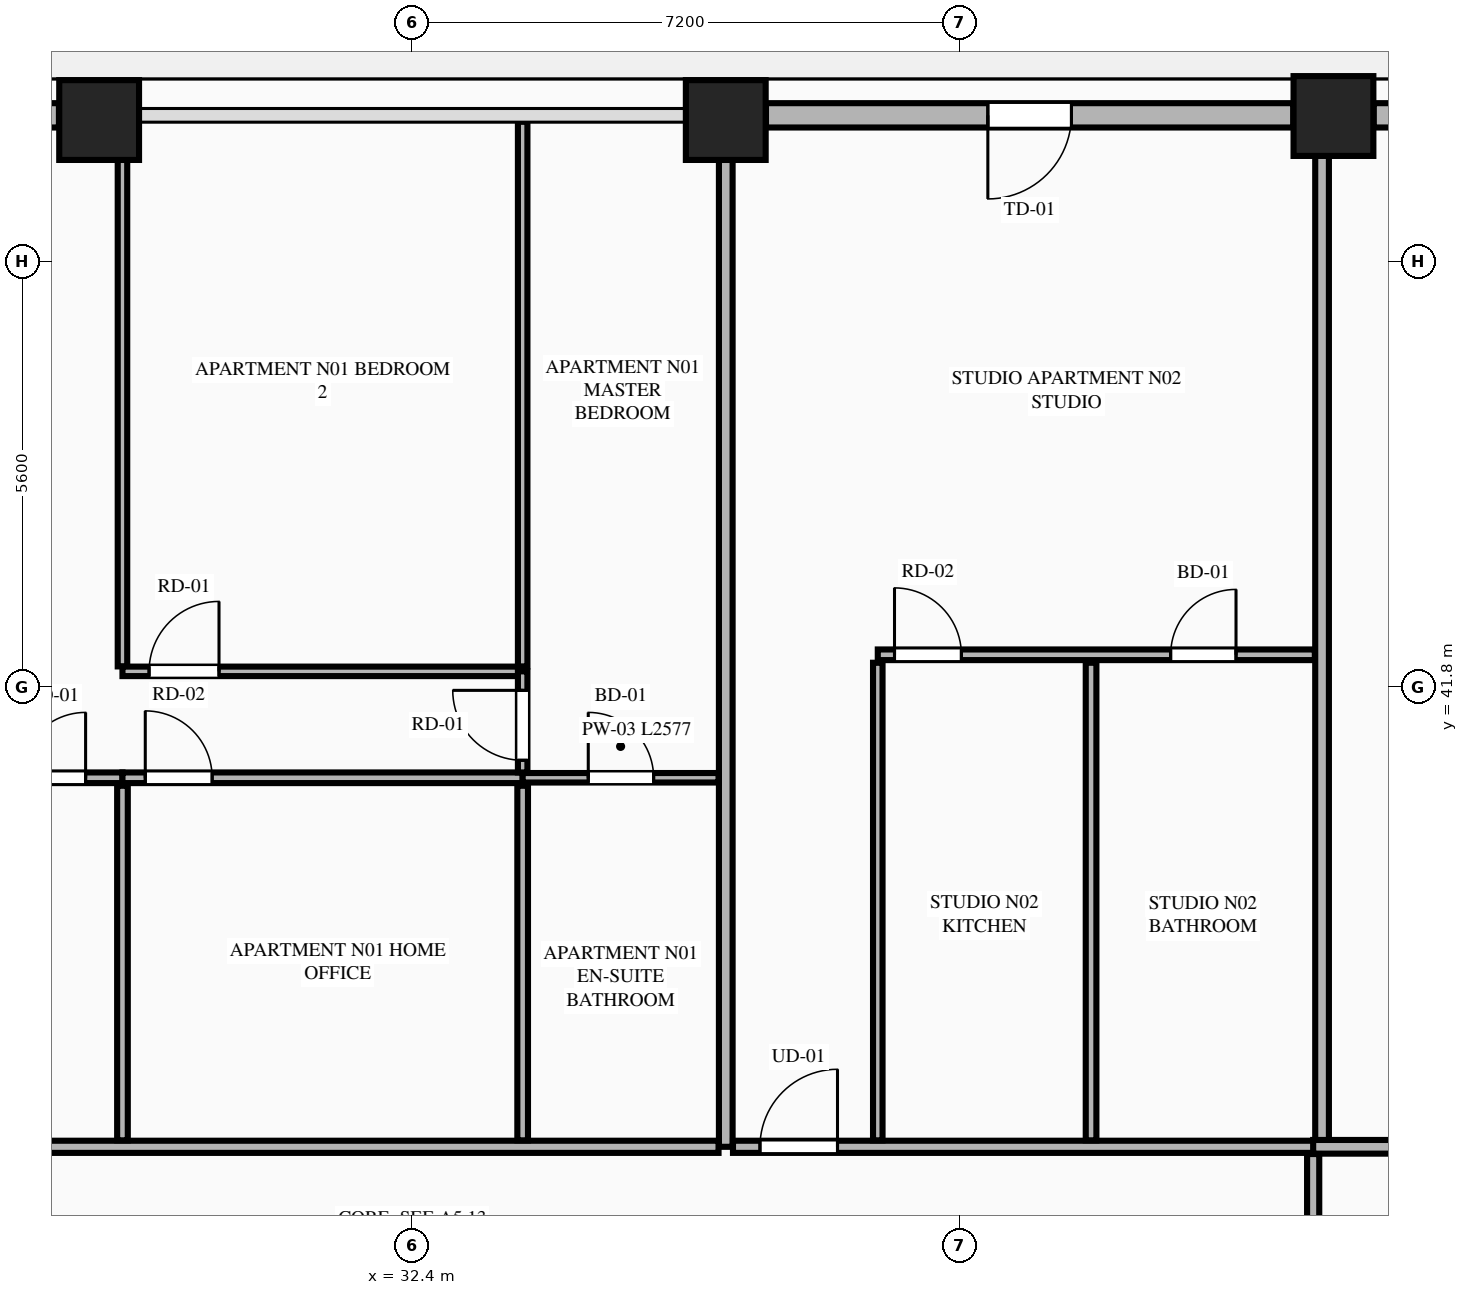
"""IFC4 building model, lengths in metres.
Left out: names, types, materials, properties, quantities, classifications, styles, units other than length and angle.
Written with IfcOpenShell. Run it as: python <this file> out.ifc"""

import sys

from ifc_helpers import new_model, si_unit, direction, frame, frame_2d, origin, origin_2d, place, context, subcontext, project, spatial, rectangle, extrude, element, fill, save


model = new_model("IFC4")
c1 = context("Model", 3, precision=1e-05, world=origin(), true_north=direction((0.0, 1.0)))
c2 = subcontext(c1, "Body", "Model", "MODEL_VIEW")
j1 = project(units=[si_unit("LENGTHUNIT", "METRE"), si_unit("PLANEANGLEUNIT", "RADIAN")], contexts=[c1])
p1 = place(None, origin())
s1 = spatial("IfcSite", under=j1, at=p1, CompositionType="ELEMENT")
p2 = place(p1, origin())
s2 = spatial("IfcBuilding", under=s1, at=p2, CompositionType="ELEMENT")
p3 = place(p2, frame((0.0, 0.0, 94.2)))
s3 = spatial("IfcBuildingStorey", under=s2, at=p3, CompositionType="ELEMENT", Elevation=94.2)
for number, where, z_axis, x_axis in (
    (1, (44.517, 49.311, 0.0), (0.0, 0.0, 1.0), (1.0, 0.0, 0.0)),
    (2, (36.522, 49.258, 0.0), (0.0, 0.0, 1.0), (1.0, 0.0, 0.0)),
    (3, (28.278, 49.258, 0.0), (0.0, 0.0, 1.0), (1.0, 0.0, 0.0)),
):
    element("IfcColumn", number, at=place(p3, frame(where, z_axis=z_axis, x_axis=x_axis)), inside=s3, PredefinedType="COLUMN", context=c2, shape_type="SweptSolid", body=[
        extrude(rectangle(XDim=1.05, YDim=1.05, at=origin_2d()), origin(), (0.0, 0.0, 1.0), 4.2),
    ])
p4 = place(p3, frame((46.364, 49.32, 0.0), z_axis=(0.0, 0.0, 1.0), x_axis=(-1.0, 0.0, 0.0)))
e4 = element("IfcWall", 4, at=p4, inside=s3, PredefinedType="STANDARD", context=c2, shape_type="SweptSolid", body=[
    extrude(rectangle(XDim=1.318, YDim=0.32, at=frame_2d((0.659, 0.0))), origin(), (0.0, 0.0, 1.0), 3.99),
])
p5 = place(p4, frame((0.22, 0.0, 0.75)))
e5 = element("IfcOpeningElement", 5, at=p5, cuts=e4, PredefinedType="OPENING", context=c2, shape_type="SweptSolid", body=[
    extrude(rectangle(XDim=0.878, YDim=1.7, at=frame_2d((0.439, 0.85))), frame((0.0, 0.17, 0.0), z_axis=(0.0, -1.0, 0.0), x_axis=(1.0, 0.0, 0.0)), (0.0, 0.0, 1.0), 0.34),
])
p6 = place(p3, frame((43.988, 49.32, 0.0), z_axis=(0.0, 0.0, 1.0), x_axis=(-1.0, 0.0, 0.0)))
e6 = element("IfcWall", 6, at=p6, inside=s3, PredefinedType="STANDARD", context=c2, shape_type="SweptSolid", body=[
    extrude(rectangle(XDim=6.937, YDim=0.32, at=frame_2d((3.469, 0.0))), origin(), (0.0, 0.0, 1.0), 2.59),
])
p7 = place(p6, frame((2.918, 0.0, 0.0)))
e7 = element("IfcOpeningElement", 7, at=p7, cuts=e6, PredefinedType="OPENING", context=c2, shape_type="SweptSolid", body=[
    extrude(rectangle(XDim=1.1, YDim=2.25, at=frame_2d((0.55, 1.125))), frame((0.0, 0.17, 0.0), z_axis=(0.0, -1.0, 0.0), x_axis=(1.0, 0.0, 0.0)), (0.0, 0.0, 1.0), 0.34),
])
p8 = place(p3, frame((27.749, 49.32, 0.0), z_axis=(0.0, 0.0, 1.0), x_axis=(-1.0, 0.0, 0.0)))
e8 = element("IfcWall", 8, at=p8, inside=s3, PredefinedType="STANDARD", context=c2, shape_type="SweptSolid", body=[
    extrude(rectangle(XDim=6.937, YDim=0.32, at=frame_2d((3.469, 0.0))), origin(), (0.0, 0.0, 1.0), 2.59),
])
p9 = place(p8, frame((2.918, 0.0, 0.75)))
e9 = element("IfcOpeningElement", 9, at=p9, cuts=e8, PredefinedType="OPENING", context=c2, shape_type="SweptSolid", body=[
    extrude(rectangle(XDim=1.1, YDim=1.69, at=frame_2d((0.55, 0.845))), frame((0.0, 0.17, 0.0), z_axis=(0.0, -1.0, 0.0), x_axis=(1.0, 0.0, 0.0)), (0.0, 0.0, 1.0), 0.34),
])
for number, where, z_axis, x_axis in (
    (10, (36.522, 35.75, 0.0), (0.0, 0.0, 1.0), (0.0, 1.0, 0.0)),
    (11, (44.367, 35.75, 0.0), (0.0, 0.0, 1.0), (0.0, 1.0, 0.0)),
):
    element("IfcWall", number, at=place(p3, frame(where, z_axis=z_axis, x_axis=x_axis)), inside=s3, PredefinedType="PARTITIONING", context=c2, shape_type="SweptSolid", body=[
        extrude(rectangle(XDim=13.485, YDim=0.18, at=frame_2d((6.743, 0.0))), origin(), (0.0, 0.0, 1.0), 2.59),
    ])
p10 = place(p3, frame((20.528, 35.75, 0.0), z_axis=(0.0, 0.0, 1.0), x_axis=(1.0, 0.0, 0.0)))
e12 = element("IfcWall", 12, at=p10, inside=s3, PredefinedType="PARTITIONING", context=c2, shape_type="SweptSolid", body=[
    extrude(rectangle(XDim=15.899, YDim=0.16, at=frame_2d((7.949, 0.0))), origin(), (0.0, 0.0, 1.0), 3.99),
])
p11 = place(p10, frame((0.572, 0.0, 0.0)))
e13 = element("IfcOpeningElement", 13, at=p11, cuts=e12, PredefinedType="OPENING", context=c2, shape_type="SweptSolid", body=[
    extrude(rectangle(XDim=1.35, YDim=2.35, at=frame_2d((0.675, 1.175))), frame((0.0, 0.09, 0.0), z_axis=(0.0, -1.0, 0.0), x_axis=(1.0, 0.0, 0.0)), (0.0, 0.0, 1.0), 0.18),
])
p12 = place(p3, frame((22.65, 40.605, 0.0), z_axis=(0.0, 0.0, 1.0), x_axis=(1.0, 0.0, 0.0)))
e14 = element("IfcWall", 14, at=p12, inside=s3, PredefinedType="PLUMBINGWALL", context=c2, shape_type="SweptSolid", body=[
    extrude(rectangle(XDim=5.935, YDim=0.14, at=frame_2d((2.968, 0.0))), origin(), (0.0, 0.0, 1.0), 3.99),
])
p13 = place(p12, frame((4.59, 0.0, 0.0)))
e15 = element("IfcOpeningElement", 15, at=p13, cuts=e14, PredefinedType="OPENING", context=c2, shape_type="SweptSolid", body=[
    extrude(rectangle(XDim=0.86, YDim=2.1, at=frame_2d((0.43, 1.05))), frame((0.0, 0.08, 0.0), z_axis=(0.0, -1.0, 0.0), x_axis=(1.0, 0.0, 0.0)), (0.0, 0.0, 1.0), 0.16),
])
p14 = place(p12, frame((0.26, 0.0, 0.0)))
e16 = element("IfcOpeningElement", 16, at=p14, cuts=e14, PredefinedType="OPENING", context=c2, shape_type="SweptSolid", body=[
    extrude(rectangle(XDim=0.88, YDim=2.15, at=frame_2d((0.44, 1.075))), frame((0.0, 0.08, 0.0), z_axis=(0.0, -1.0, 0.0), x_axis=(1.0, 0.0, 0.0)), (0.0, 0.0, 1.0), 0.16),
])
p15 = place(p12, frame((2.735, 0.0, 0.0)))
e17 = element("IfcOpeningElement", 17, at=p15, cuts=e14, PredefinedType="OPENING", context=c2, shape_type="SweptSolid", body=[
    extrude(rectangle(XDim=0.88, YDim=2.15, at=frame_2d((0.44, 1.075))), frame((0.0, 0.08, 0.0), z_axis=(0.0, -1.0, 0.0), x_axis=(1.0, 0.0, 0.0)), (0.0, 0.0, 1.0), 0.16),
])
p16 = place(p3, frame((28.585, 40.605, 0.0), z_axis=(0.0, 0.0, 1.0), x_axis=(1.0, 0.0, 0.0)))
e18 = element("IfcWall", 18, at=p16, inside=s3, PredefinedType="PLUMBINGWALL", context=c2, shape_type="SweptSolid", body=[
    extrude(rectangle(XDim=5.265, YDim=0.14, at=frame_2d((2.633, 0.0))), origin(), (0.0, 0.0, 1.0), 3.99),
])
p17 = place(p16, frame((0.3, 0.0, 0.0)))
e19 = element("IfcOpeningElement", 19, at=p17, cuts=e18, PredefinedType="OPENING", context=c2, shape_type="SweptSolid", body=[
    extrude(rectangle(XDim=0.88, YDim=2.15, at=frame_2d((0.44, 1.075))), frame((0.0, 0.08, 0.0), z_axis=(0.0, -1.0, 0.0), x_axis=(1.0, 0.0, 0.0)), (0.0, 0.0, 1.0), 0.16),
])
p18 = place(p3, frame((33.85, 40.605, 0.0), z_axis=(0.0, 0.0, 1.0), x_axis=(1.0, 0.0, 0.0)))
e20 = element("IfcWall", 20, at=p18, inside=s3, PredefinedType="PARTITIONING", context=c2, shape_type="SweptSolid", body=[
    extrude(rectangle(XDim=2.577, YDim=0.125, at=frame_2d((1.289, 0.0))), origin(), (0.0, 0.0, 1.0), 3.99),
])
p19 = place(p18, frame((0.863, 0.0, 0.0)))
e21 = element("IfcOpeningElement", 21, at=p19, cuts=e20, PredefinedType="OPENING", context=c2, shape_type="SweptSolid", body=[
    extrude(rectangle(XDim=0.86, YDim=2.1, at=frame_2d((0.43, 1.05))), frame((0.0, 0.073, 0.0), z_axis=(0.0, -1.0, 0.0), x_axis=(1.0, 0.0, 0.0)), (0.0, 0.0, 1.0), 0.145),
])
p20 = place(p3, frame((28.585, 42.07, 0.0), z_axis=(0.0, 0.0, 1.0), x_axis=(0.0, 1.0, 0.0)))
e22 = element("IfcWall", 22, at=p20, inside=s3, PredefinedType="PARTITIONING", context=c2, shape_type="SweptSolid", body=[
    extrude(rectangle(XDim=7.165, YDim=0.125, at=frame_2d((3.583, 0.0))), origin(), (0.0, 0.0, 1.0), 2.59),
])
p21 = place(p3, frame((28.585, 42.005, 0.0), z_axis=(0.0, 0.0, 1.0), x_axis=(1.0, 0.0, 0.0)))
e23 = element("IfcWall", 23, at=p21, inside=s3, PredefinedType="PARTITIONING", context=c2, shape_type="SweptSolid", body=[
    extrude(rectangle(XDim=5.265, YDim=0.125, at=frame_2d((2.633, 0.0))), origin(), (0.0, 0.0, 1.0), 3.99),
])
p22 = place(p21, frame((0.35, 0.0, 0.0)))
e24 = element("IfcOpeningElement", 24, at=p22, cuts=e23, PredefinedType="OPENING", context=c2, shape_type="SweptSolid", body=[
    extrude(rectangle(XDim=0.92, YDim=2.15, at=frame_2d((0.46, 1.075))), frame((0.0, 0.073, 0.0), z_axis=(0.0, -1.0, 0.0), x_axis=(1.0, 0.0, 0.0)), (0.0, 0.0, 1.0), 0.145),
])
p23 = place(p3, frame((33.85, 40.675, 0.0), z_axis=(0.0, 0.0, 1.0), x_axis=(0.0, 1.0, 0.0)))
e25 = element("IfcWall", 25, at=p23, inside=s3, PredefinedType="PARTITIONING", context=c2, shape_type="SweptSolid", body=[
    extrude(rectangle(XDim=1.33, YDim=0.125, at=frame_2d((0.665, 0.0))), origin(), (0.0, 0.0, 1.0), 3.99),
])
p24 = place(p23, frame((0.16, 0.0, 0.0)))
e26 = element("IfcOpeningElement", 26, at=p24, cuts=e25, PredefinedType="OPENING", context=c2, shape_type="SweptSolid", body=[
    extrude(rectangle(XDim=0.92, YDim=2.15, at=frame_2d((0.46, 1.075))), frame((0.0, 0.073, 0.0), z_axis=(0.0, -1.0, 0.0), x_axis=(1.0, 0.0, 0.0)), (0.0, 0.0, 1.0), 0.145),
])
p25 = place(p3, frame((28.585, 35.835, 0.0), z_axis=(0.0, 0.0, 1.0), x_axis=(0.0, 1.0, 0.0)))
e27 = element("IfcWall", 27, at=p25, inside=s3, PredefinedType="PLUMBINGWALL", context=c2, shape_type="SweptSolid", body=[
    extrude(rectangle(XDim=4.665, YDim=0.14, at=frame_2d((2.333, 0.0))), origin(), (0.0, 0.0, 1.0), 2.59),
])
p26 = place(p3, frame((33.85, 35.835, 0.0), z_axis=(0.0, 0.0, 1.0), x_axis=(0.0, 1.0, 0.0)))
e28 = element("IfcWall", 28, at=p26, inside=s3, PredefinedType="PLUMBINGWALL", context=c2, shape_type="SweptSolid", body=[
    extrude(rectangle(XDim=4.665, YDim=0.14, at=frame_2d((2.333, 0.0))), origin(), (0.0, 0.0, 1.0), 3.99),
])
p27 = place(p3, frame((33.85, 42.07, 0.0), z_axis=(0.0, 0.0, 1.0), x_axis=(0.0, 1.0, 0.0)))
e29 = element("IfcWall", 29, at=p27, inside=s3, PredefinedType="PARTITIONING", context=c2, shape_type="SweptSolid", body=[
    extrude(rectangle(XDim=7.165, YDim=0.125, at=frame_2d((3.583, 0.0))), origin(), (0.0, 0.0, 1.0), 3.99),
])
p28 = place(p3, frame((36.617, 35.75, 0.0), z_axis=(0.0, 0.0, 1.0), x_axis=(1.0, 0.0, 0.0)))
e30 = element("IfcWall", 30, at=p28, inside=s3, PredefinedType="PARTITIONING", context=c2, shape_type="SweptSolid", body=[
    extrude(rectangle(XDim=7.655, YDim=0.16, at=frame_2d((3.828, 0.0))), origin(), (0.0, 0.0, 1.0), 3.99),
])
p29 = place(p28, frame((0.355, 0.0, 0.0)))
e31 = element("IfcOpeningElement", 31, at=p29, cuts=e30, PredefinedType="OPENING", context=c2, shape_type="SweptSolid", body=[
    extrude(rectangle(XDim=1.02, YDim=2.25, at=frame_2d((0.51, 1.125))), frame((0.0, 0.09, 0.0), z_axis=(0.0, -1.0, 0.0), x_axis=(1.0, 0.0, 0.0)), (0.0, 0.0, 1.0), 0.18),
])
p30 = place(p3, frame((38.522, 35.835, 0.0), z_axis=(0.0, 0.0, 1.0), x_axis=(0.0, 1.0, 0.0)))
e32 = element("IfcWall", 32, at=p30, inside=s3, PredefinedType="PARTITIONING", context=c2, shape_type="SweptSolid", body=[
    extrude(rectangle(XDim=6.283, YDim=0.125, at=frame_2d((3.142, 0.0))), origin(), (0.0, 0.0, 1.0), 3.99),
])
p31 = place(p3, frame((38.522, 42.223, 0.0), z_axis=(0.0, 0.0, 1.0), x_axis=(1.0, 0.0, 0.0)))
e33 = element("IfcWall", 33, at=p31, inside=s3, PredefinedType="PLUMBINGWALL", context=c2, shape_type="SweptSolid", body=[
    extrude(rectangle(XDim=5.75, YDim=0.14, at=frame_2d((2.875, 0.0))), origin(), (0.0, 0.0, 1.0), 3.99),
])
p32 = place(p31, frame((3.853, 0.0, 0.0)))
e34 = element("IfcOpeningElement", 34, at=p32, cuts=e33, PredefinedType="OPENING", context=c2, shape_type="SweptSolid", body=[
    extrude(rectangle(XDim=0.86, YDim=2.1, at=frame_2d((0.43, 1.05))), frame((0.0, 0.08, 0.0), z_axis=(0.0, -1.0, 0.0), x_axis=(1.0, 0.0, 0.0)), (0.0, 0.0, 1.0), 0.16),
])
p33 = place(p31, frame((0.22, 0.0, 0.0)))
e35 = element("IfcOpeningElement", 35, at=p33, cuts=e33, PredefinedType="OPENING", context=c2, shape_type="SweptSolid", body=[
    extrude(rectangle(XDim=0.88, YDim=2.15, at=frame_2d((0.44, 1.075))), frame((0.0, 0.08, 0.0), z_axis=(0.0, -1.0, 0.0), x_axis=(1.0, 0.0, 0.0)), (0.0, 0.0, 1.0), 0.16),
])
p34 = place(p3, frame((41.328, 35.835, 0.0), z_axis=(0.0, 0.0, 1.0), x_axis=(0.0, 1.0, 0.0)))
e36 = element("IfcWall", 36, at=p34, inside=s3, PredefinedType="PLUMBINGWALL", context=c2, shape_type="SweptSolid", body=[
    extrude(rectangle(XDim=6.283, YDim=0.14, at=frame_2d((3.142, 0.0))), origin(), (0.0, 0.0, 1.0), 2.59),
])
p35 = place(p3, frame((44.25, 35.75, 0.0), z_axis=(0.0, 0.0, 1.0), x_axis=(1.0, 0.0, 0.0)))
e37 = element("IfcWall", 37, at=p35, inside=s3, PredefinedType="PARTITIONING", context=c2, shape_type="SweptSolid", body=[
    extrude(rectangle(XDim=9.947, YDim=0.18, at=frame_2d((4.974, 0.0))), origin(), (0.0, 0.0, 1.0), 3.99),
])
p36 = place(p3, frame((44.25, 16.295, 0.0), z_axis=(0.0, 0.0, 1.0), x_axis=(0.0, 1.0, 0.0)))
e38 = element("IfcWall", 38, at=p36, inside=s3, PredefinedType="PARTITIONING", context=c2, shape_type="SweptSolid", body=[
    extrude(rectangle(XDim=19.36, YDim=0.16, at=frame_2d((9.68, 0.0))), origin(), (0.0, 0.0, 1.0), 2.59),
])
p37 = place(p36, frame((0.45, 0.0, 0.0)))
e39 = element("IfcOpeningElement", 39, at=p37, cuts=e38, PredefinedType="OPENING", context=c2, shape_type="SweptSolid", body=[
    extrude(rectangle(XDim=1.02, YDim=2.25, at=frame_2d((0.51, 1.125))), frame((0.0, 0.09, 0.0), z_axis=(0.0, -1.0, 0.0), x_axis=(1.0, 0.0, 0.0)), (0.0, 0.0, 1.0), 0.18),
])
p38 = place(p7, origin())
e40 = element("IfcDoor", 40, at=p38, inside=s3, OperationType="SINGLE_SWING_RIGHT", PredefinedType="DOOR", context=c2, shape_type="SweptSolid", body=[
    extrude(rectangle(XDim=1.1, YDim=2.25, at=frame_2d((0.55, 1.125))), frame((0.0, 0.025, 0.0), z_axis=(0.0, -1.0, 0.0), x_axis=(1.0, 0.0, 0.0)), (0.0, 0.0, 1.0), 0.05),
])
fill(e7, e40)
p39 = place(p13, origin())
e41 = element("IfcDoor", 41, at=p39, inside=s3, OperationType="SINGLE_SWING_RIGHT", PredefinedType="DOOR", context=c2, shape_type="SweptSolid", body=[
    extrude(rectangle(XDim=0.86, YDim=2.1, at=frame_2d((0.43, 1.05))), frame((0.0, 0.025, 0.0), z_axis=(0.0, -1.0, 0.0), x_axis=(1.0, 0.0, 0.0)), (0.0, 0.0, 1.0), 0.05),
])
fill(e15, e41)
p40 = place(p19, origin())
e42 = element("IfcDoor", 42, at=p40, inside=s3, OperationType="SINGLE_SWING_LEFT", PredefinedType="DOOR", context=c2, shape_type="SweptSolid", body=[
    extrude(rectangle(XDim=0.86, YDim=2.1, at=frame_2d((0.43, 1.05))), frame((0.0, 0.025, 0.0), z_axis=(0.0, -1.0, 0.0), x_axis=(1.0, 0.0, 0.0)), (0.0, 0.0, 1.0), 0.05),
])
fill(e21, e42)
p41 = place(p17, origin())
e43 = element("IfcDoor", 43, at=p41, inside=s3, OperationType="SINGLE_SWING_LEFT", PredefinedType="DOOR", context=c2, shape_type="SweptSolid", body=[
    extrude(rectangle(XDim=0.88, YDim=2.15, at=frame_2d((0.44, 1.075))), frame((0.0, 0.025, 0.0), z_axis=(0.0, -1.0, 0.0), x_axis=(1.0, 0.0, 0.0)), (0.0, 0.0, 1.0), 0.05),
])
fill(e19, e43)
p42 = place(p22, origin())
e44 = element("IfcDoor", 44, at=p42, inside=s3, OperationType="SINGLE_SWING_RIGHT", PredefinedType="DOOR", context=c2, shape_type="SweptSolid", body=[
    extrude(rectangle(XDim=0.92, YDim=2.15, at=frame_2d((0.46, 1.075))), frame((0.0, 0.025, 0.0), z_axis=(0.0, -1.0, 0.0), x_axis=(1.0, 0.0, 0.0)), (0.0, 0.0, 1.0), 0.05),
])
fill(e24, e44)
p43 = place(p24, origin())
e45 = element("IfcDoor", 45, at=p43, inside=s3, OperationType="SINGLE_SWING_RIGHT", PredefinedType="DOOR", context=c2, shape_type="SweptSolid", body=[
    extrude(rectangle(XDim=0.92, YDim=2.15, at=frame_2d((0.46, 1.075))), frame((0.0, 0.025, 0.0), z_axis=(0.0, -1.0, 0.0), x_axis=(1.0, 0.0, 0.0)), (0.0, 0.0, 1.0), 0.05),
])
fill(e26, e45)
p44 = place(p32, origin())
e46 = element("IfcDoor", 46, at=p44, inside=s3, OperationType="SINGLE_SWING_RIGHT", PredefinedType="DOOR", context=c2, shape_type="SweptSolid", body=[
    extrude(rectangle(XDim=0.86, YDim=2.1, at=frame_2d((0.43, 1.05))), frame((0.0, 0.025, 0.0), z_axis=(0.0, -1.0, 0.0), x_axis=(1.0, 0.0, 0.0)), (0.0, 0.0, 1.0), 0.05),
])
fill(e34, e46)
p45 = place(p29, origin())
e47 = element("IfcDoor", 47, at=p45, inside=s3, OperationType="SINGLE_SWING_RIGHT", PredefinedType="DOOR", context=c2, shape_type="SweptSolid", body=[
    extrude(rectangle(XDim=1.02, YDim=2.25, at=frame_2d((0.51, 1.125))), frame((0.0, 0.025, 0.0), z_axis=(0.0, -1.0, 0.0), x_axis=(1.0, 0.0, 0.0)), (0.0, 0.0, 1.0), 0.05),
])
fill(e31, e47)
p46 = place(p33, origin())
e48 = element("IfcDoor", 48, at=p46, inside=s3, OperationType="SINGLE_SWING_LEFT", PredefinedType="DOOR", context=c2, shape_type="SweptSolid", body=[
    extrude(rectangle(XDim=0.88, YDim=2.15, at=frame_2d((0.44, 1.075))), frame((0.0, 0.025, 0.0), z_axis=(0.0, -1.0, 0.0), x_axis=(1.0, 0.0, 0.0)), (0.0, 0.0, 1.0), 0.05),
])
fill(e35, e48)
save(model, sys.argv[1])
